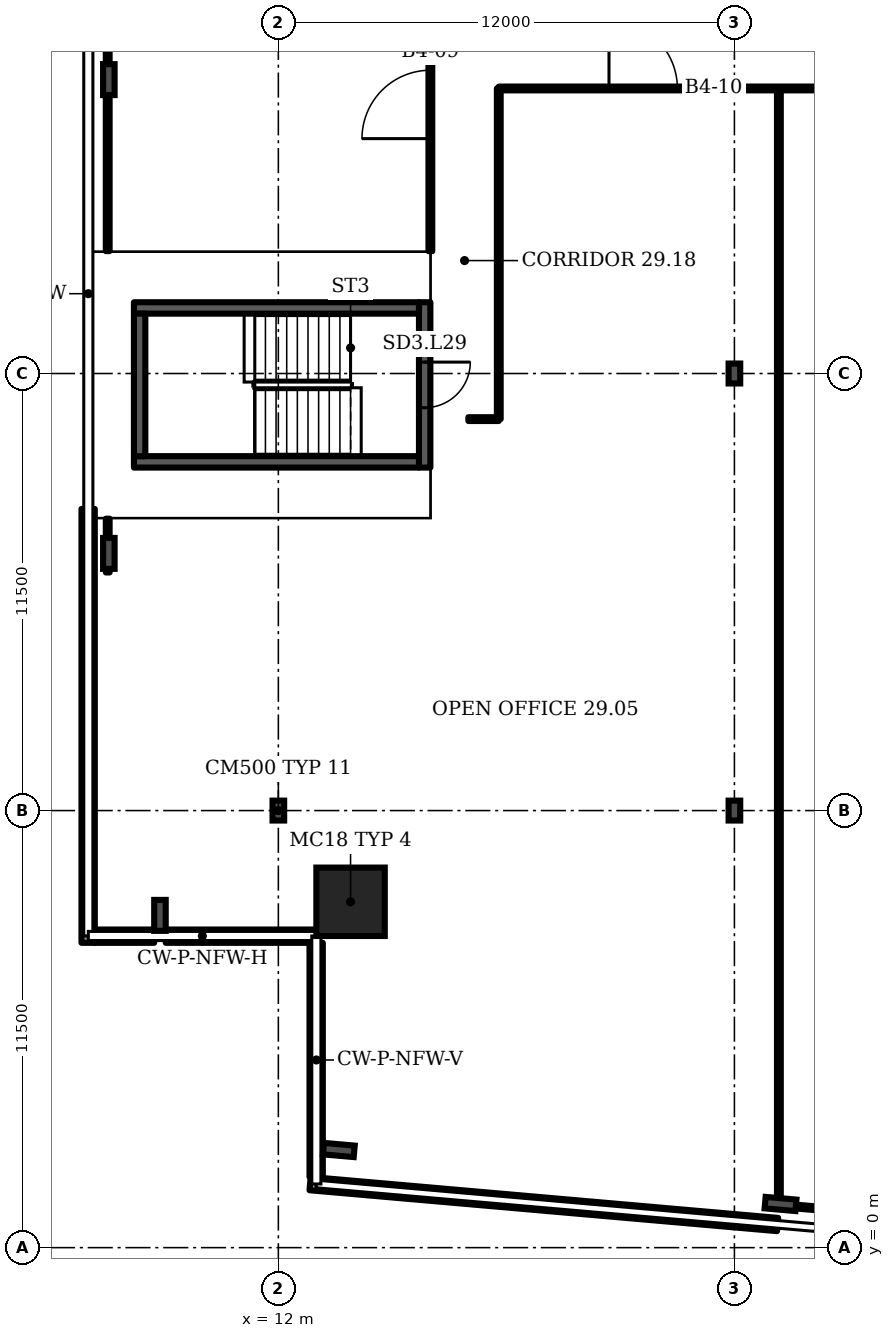
"""IFC4 building model, lengths in metres.
Left out: names, types, materials, properties, quantities, classifications, styles, units other than length and angle.
Written with IfcOpenShell. Run it as: python <this file> out.ifc"""

import sys

from ifc_helpers import new_model, si_unit, direction, frame, frame_2d, origin, origin_2d, place, context, subcontext, project, spatial, rectangle, i_section, extrude, element, fill, save


model = new_model("IFC4")
c1 = context("Model", 3, precision=1e-05, world=origin(), true_north=direction((0.0, 1.0)))
c2 = subcontext(c1, "Body", "Model", "MODEL_VIEW")
j1 = project(units=[si_unit("LENGTHUNIT", "METRE"), si_unit("PLANEANGLEUNIT", "RADIAN")], contexts=[c1])
p1 = place(None, origin())
s1 = spatial("IfcSite", under=j1, at=p1, CompositionType="ELEMENT")
p2 = place(p1, origin())
s2 = spatial("IfcBuilding", under=s1, at=p2, CompositionType="ELEMENT")
p3 = place(p2, frame((0.0, 0.0, 125.5)))
s3 = spatial("IfcBuildingStorey", under=s2, at=p3, CompositionType="ELEMENT", Elevation=125.5)
p4 = place(p3, frame((13.9, 9.1, 0.0), z_axis=(0.0, 0.0, 1.0), x_axis=(1.0, 0.0, 0.0)))
e1 = element("IfcColumn", 1, at=p4, inside=s3, PredefinedType="COLUMN", context=c2, shape_type="SweptSolid", body=[
    extrude(rectangle(XDim=1.8, YDim=1.8, at=origin_2d()), origin(), (0.0, 0.0, 1.0), 3.6),
])
for number, where, z_axis, x_axis in (
    (2, (13.591, 2.569, 0.0), (0.0, 0.0, 1.0), (-0.087, -0.996, 0.0)),
    (3, (25.214, 1.149, 0.0), (0.0, 0.0, 1.0), (-0.087, -0.996, 0.0)),
    (4, (7.54, 30.733, 0.0), (0.0, 0.0, 1.0), (-1.0, 0.0, 0.0)),
    (5, (7.54, 18.267, 0.0), (0.0, 0.0, 1.0), (-1.0, 0.0, 0.0)),
    (6, (8.885, 8.743, 0.0), (0.0, 0.0, 1.0), (-1.0, 0.0, 0.0)),
):
    element("IfcColumn", number, at=place(p3, frame(where, z_axis=z_axis, x_axis=x_axis)), inside=s3, PredefinedType="COLUMN", context=c2, shape_type="SweptSolid", body=[
        extrude(i_section(OverallWidth=0.303, OverallDepth=0.814, WebThickness=0.021, FlangeThickness=0.04, FilletRadius=0.03, at=origin_2d()), origin(), (0.0, 0.0, 1.0), 3.6),
    ])
for number, where, z_axis, x_axis in (
    (7, (12.0, 11.5, 0.0), (0.0, 0.0, 1.0), (1.0, 0.0, 0.0)),
    (8, (24.0, 11.5, 0.0), (0.0, 0.0, 1.0), (1.0, 0.0, 0.0)),
    (9, (24.0, 23.0, 0.0), (0.0, 0.0, 1.0), (1.0, 0.0, 0.0)),
):
    element("IfcColumn", number, at=place(p3, frame(where, z_axis=z_axis, x_axis=x_axis)), inside=s3, PredefinedType="COLUMN", context=c2, shape_type="SweptSolid", body=[
        extrude(i_section(OverallWidth=0.306, OverallDepth=0.524, WebThickness=0.021, FlangeThickness=0.04, FilletRadius=0.027, at=origin_2d()), origin(), (0.0, 0.0, 1.0), 3.6),
    ])
p5 = place(p3, frame((12.835, 1.685, 0.0), z_axis=(0.0, 0.0, 1.0), x_axis=(0.996192, -0.087173, 0.0)))
e10 = element("IfcWall", 10, at=p5, inside=s3, PredefinedType="SOLIDWALL", context=c2, shape_type="SweptSolid", body=[
    extrude(rectangle(XDim=12.348, YDim=0.35, at=frame_2d((6.174, 0.0))), origin(), (0.0, 0.0, 1.0), 1.0),
])
p6 = place(p3, frame((6.995, 19.437, 0.0), z_axis=(0.0, 0.0, 1.0), x_axis=(0.0, -1.0, 0.0)))
e11 = element("IfcWall", 11, at=p6, inside=s3, PredefinedType="SOLIDWALL", context=c2, shape_type="SweptSolid", body=[
    extrude(rectangle(XDim=11.417, YDim=0.35, at=frame_2d((5.708, 0.0))), origin(), (0.0, 0.0, 1.0), 1.0),
])
p7 = place(p3, frame((7.17, 8.195, 0.0), z_axis=(0.0, 0.0, 1.0), x_axis=(1.0, 0.0, 0.0)))
e12 = element("IfcWall", 12, at=p7, inside=s3, PredefinedType="SOLIDWALL", context=c2, shape_type="SweptSolid", body=[
    extrude(rectangle(XDim=1.563, YDim=0.35, at=frame_2d((0.782, 0.0))), origin(), (0.0, 0.0, 1.0), 1.0),
])
p8 = place(p3, frame((9.036, 8.195, 0.0), z_axis=(0.0, 0.0, 1.0), x_axis=(1.0, 0.0, 0.0)))
e13 = element("IfcWall", 13, at=p8, inside=s3, PredefinedType="SOLIDWALL", context=c2, shape_type="SweptSolid", body=[
    extrude(rectangle(XDim=3.964, YDim=0.35, at=frame_2d((1.982, 0.0))), origin(), (0.0, 0.0, 1.0), 1.0),
])
p9 = place(p3, frame((12.995, 8.02, 0.0), z_axis=(0.0, 0.0, 1.0), x_axis=(0.0, -1.0, 0.0)))
e14 = element("IfcWall", 14, at=p9, inside=s3, PredefinedType="SOLIDWALL", context=c2, shape_type="SweptSolid", body=[
    extrude(rectangle(XDim=6.161, YDim=0.35, at=frame_2d((3.081, 0.0))), origin(), (0.0, 0.0, 1.0), 1.0),
])
p10 = place(p3, frame((15.85, 20.525, 0.0), z_axis=(0.0, 0.0, 1.0), x_axis=(0.0, 1.0, 0.0)))
e15 = element("IfcWall", 15, at=p10, inside=s3, PredefinedType="SHEAR", context=c2, shape_type="SweptSolid", body=[
    extrude(rectangle(XDim=4.35, YDim=0.3, at=frame_2d((2.175, 0.0))), origin(), (0.0, 0.0, 1.0), 3.2),
])
p11 = place(p10, frame((1.575, 0.0, 0.0)))
e16 = element("IfcOpeningElement", 16, at=p11, cuts=e15, PredefinedType="OPENING", context=c2, shape_type="SweptSolid", body=[
    extrude(rectangle(XDim=1.2, YDim=2.1, at=frame_2d((0.6, 1.05))), frame((0.0, 0.16, 0.0), z_axis=(0.0, -1.0, 0.0), x_axis=(1.0, 0.0, 0.0)), (0.0, 0.0, 1.0), 0.32),
])
p12 = place(p3, frame((7.51, 17.765, 0.0), z_axis=(0.0, 0.0, 1.0), x_axis=(0.0, 1.0, 0.0)))
e17 = element("IfcWall", 17, at=p12, inside=s3, PredefinedType="PARTITIONING", context=c2, shape_type="SweptSolid", body=[
    extrude(rectangle(XDim=1.415, YDim=0.1, at=frame_2d((0.708, 0.0))), origin(), (0.0, 0.0, 1.0), 2.58),
])
p13 = place(p3, frame((7.51, 26.22, 0.0), z_axis=(0.0, 0.0, 1.0), x_axis=(0.0, 1.0, 0.0)))
e18 = element("IfcWall", 18, at=p13, inside=s3, PredefinedType="PARTITIONING", context=c2, shape_type="SweptSolid", body=[
    extrude(rectangle(XDim=15.76, YDim=0.1, at=frame_2d((7.88, 0.0))), origin(), (0.0, 0.0, 1.0), 2.58),
])
p14 = place(p3, frame((16.0, 26.22, 0.0), z_axis=(0.0, 0.0, 1.0), x_axis=(0.0, 1.0, 0.0)))
e19 = element("IfcWall", 19, at=p14, inside=s3, PredefinedType="PARTITIONING", context=c2, shape_type="SweptSolid", body=[
    extrude(rectangle(XDim=7.76, YDim=0.1, at=frame_2d((3.88, 0.0))), origin(), (0.0, 0.0, 1.0), 3.2),
])
p15 = place(p14, frame((2.96, 0.0, 0.0)))
e20 = element("IfcOpeningElement", 20, at=p15, cuts=e19, PredefinedType="OPENING", context=c2, shape_type="SweptSolid", body=[
    extrude(rectangle(XDim=1.8, YDim=2.1, at=frame_2d((0.9, 1.05))), frame((0.0, 0.06, 0.0), z_axis=(0.0, -1.0, 0.0), x_axis=(1.0, 0.0, 0.0)), (0.0, 0.0, 1.0), 0.12),
])
p16 = place(p3, frame((17.0, 21.8, 0.0), z_axis=(0.0, 0.0, 1.0), x_axis=(1.0, 0.0, 0.0)))
e21 = element("IfcWall", 21, at=p16, inside=s3, PredefinedType="PARTITIONING", context=c2, shape_type="SweptSolid", body=[
    extrude(rectangle(XDim=0.8, YDim=0.1, at=frame_2d((0.4, 0.0))), origin(), (0.0, 0.0, 1.0), 3.2),
])
p17 = place(p3, frame((17.8, 21.8, 0.0), z_axis=(0.0, 0.0, 1.0), x_axis=(0.0, 1.0, 0.0)))
e22 = element("IfcWall", 22, at=p17, inside=s3, PredefinedType="PARTITIONING", context=c2, shape_type="SweptSolid", body=[
    extrude(rectangle(XDim=8.7, YDim=0.1, at=frame_2d((4.35, 0.0))), origin(), (0.0, 0.0, 1.0), 3.2),
])
p18 = place(p3, frame((17.8, 30.5, 0.0), z_axis=(0.0, 0.0, 1.0), x_axis=(1.0, 0.0, 0.0)))
e23 = element("IfcWall", 23, at=p18, inside=s3, PredefinedType="PARTITIONING", context=c2, shape_type="SweptSolid", body=[
    extrude(rectangle(XDim=19.05, YDim=0.1, at=frame_2d((9.525, 0.0))), origin(), (0.0, 0.0, 1.0), 3.2),
])
p19 = place(p18, frame((2.9, 0.0, 0.0)))
e24 = element("IfcOpeningElement", 24, at=p19, cuts=e23, PredefinedType="OPENING", context=c2, shape_type="SweptSolid", body=[
    extrude(rectangle(XDim=1.8, YDim=2.1, at=frame_2d((0.9, 1.05))), frame((0.0, 0.06, 0.0), z_axis=(0.0, -1.0, 0.0), x_axis=(1.0, 0.0, 0.0)), (0.0, 0.0, 1.0), 0.12),
])
p20 = place(p18, frame((9.99, 0.0, 0.0)))
e25 = element("IfcOpeningElement", 25, at=p20, cuts=e23, PredefinedType="OPENING", context=c2, shape_type="SweptSolid", body=[
    extrude(rectangle(XDim=1.0, YDim=2.1, at=frame_2d((0.5, 1.05))), frame((0.0, 0.06, 0.0), z_axis=(0.0, -1.0, 0.0), x_axis=(1.0, 0.0, 0.0)), (0.0, 0.0, 1.0), 0.12),
])
p21 = place(p18, frame((15.75, 0.0, 0.0)))
e26 = element("IfcOpeningElement", 26, at=p21, cuts=e23, PredefinedType="OPENING", context=c2, shape_type="SweptSolid", body=[
    extrude(rectangle(XDim=1.0, YDim=2.1, at=frame_2d((0.5, 1.05))), frame((0.0, 0.06, 0.0), z_axis=(0.0, -1.0, 0.0), x_axis=(1.0, 0.0, 0.0)), (0.0, 0.0, 1.0), 0.12),
])
p22 = place(p3, frame((25.17, 1.12, 0.0), z_axis=(0.0, 0.0, 1.0), x_axis=(0.0, 1.0, 0.0)))
e27 = element("IfcWall", 27, at=p22, inside=s3, PredefinedType="PARTITIONING", context=c2, shape_type="SweptSolid", body=[
    extrude(rectangle(XDim=29.38, YDim=0.1, at=frame_2d((14.69, 0.0))), origin(), (0.0, 0.0, 1.0), 3.2),
])
p23 = place(p3, frame((31.25, 0.59, 0.0), z_axis=(0.0, 0.0, 1.0), x_axis=(-0.996218, 0.086845, 0.0)))
e28 = element("IfcWall", 28, at=p23, inside=s3, PredefinedType="PARTITIONING", context=c2, shape_type="SweptSolid", body=[
    extrude(rectangle(XDim=6.103, YDim=0.1, at=frame_2d((3.052, 0.0))), origin(), (0.0, 0.0, 1.0), 2.58),
])
for number, where, z_axis, x_axis in (
    (29, (8.2, 20.675, 0.0), (0.0, 0.0, 1.0), (1.0, 0.0, 0.0)),
    (30, (8.2, 24.725, 0.0), (0.0, 0.0, 1.0), (1.0, 0.0, 0.0)),
):
    element("IfcWall", number, at=place(p3, frame(where, z_axis=z_axis, x_axis=x_axis)), inside=s3, PredefinedType="SHEAR", context=c2, shape_type="SweptSolid", body=[
        extrude(rectangle(XDim=7.5, YDim=0.3, at=frame_2d((3.75, 0.0))), origin(), (0.0, 0.0, 1.0), 3.2),
    ])
p24 = place(p3, frame((8.35, 20.825, 0.0), z_axis=(0.0, 0.0, 1.0), x_axis=(0.0, 1.0, 0.0)))
e31 = element("IfcWall", 31, at=p24, inside=s3, PredefinedType="SHEAR", context=c2, shape_type="SweptSolid", body=[
    extrude(rectangle(XDim=3.75, YDim=0.3, at=frame_2d((1.875, 0.0))), origin(), (0.0, 0.0, 1.0), 3.2),
])
p25 = place(p11, origin())
e32 = element("IfcDoor", 32, at=p25, inside=s3, OperationType="SINGLE_SWING_RIGHT", PredefinedType="DOOR", context=c2, shape_type="SweptSolid", body=[
    extrude(rectangle(XDim=1.2, YDim=2.1, at=frame_2d((0.6, 1.05))), frame((0.0, 0.025, 0.0), z_axis=(0.0, -1.0, 0.0), x_axis=(1.0, 0.0, 0.0)), (0.0, 0.0, 1.0), 0.05),
])
fill(e16, e32)
p26 = place(p15, origin())
e33 = element("IfcDoor", 33, at=p26, inside=s3, OperationType="DOUBLE_DOOR_SINGLE_SWING", PredefinedType="DOOR", context=c2, shape_type="SweptSolid", body=[
    extrude(rectangle(XDim=1.8, YDim=2.1, at=frame_2d((0.9, 1.05))), frame((0.0, 0.025, 0.0), z_axis=(0.0, -1.0, 0.0), x_axis=(1.0, 0.0, 0.0)), (0.0, 0.0, 1.0), 0.05),
])
fill(e20, e33)
p27 = place(p19, origin())
e34 = element("IfcDoor", 34, at=p27, inside=s3, OperationType="DOUBLE_DOOR_SINGLE_SWING", PredefinedType="DOOR", context=c2, shape_type="SweptSolid", body=[
    extrude(rectangle(XDim=1.8, YDim=2.1, at=frame_2d((0.9, 1.05))), frame((0.0, 0.025, 0.0), z_axis=(0.0, -1.0, 0.0), x_axis=(1.0, 0.0, 0.0)), (0.0, 0.0, 1.0), 0.05),
])
fill(e24, e34)
save(model, sys.argv[1])
